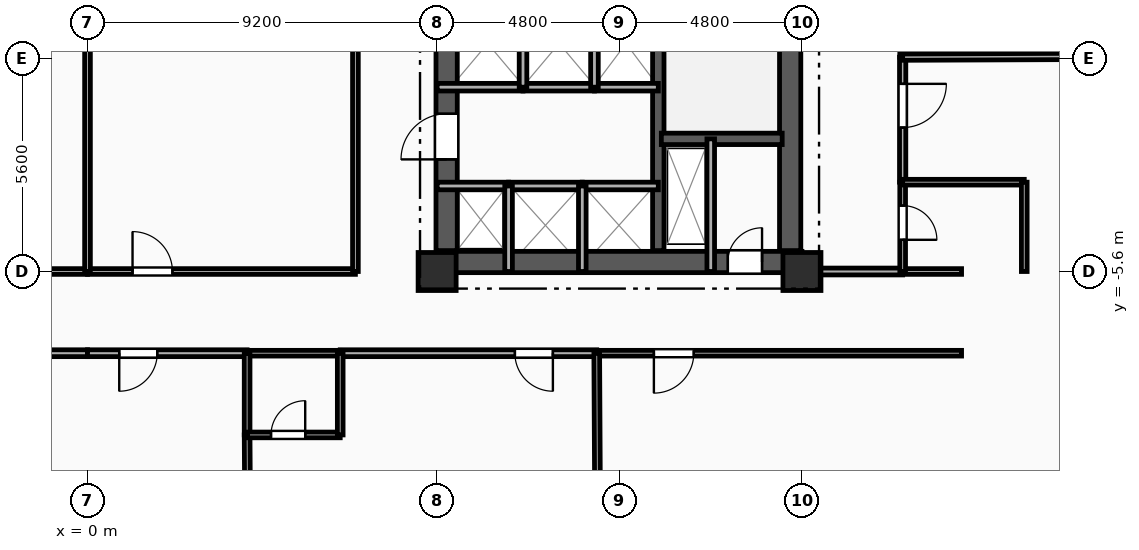
"""IFC4 building model, lengths in metres.
Left out: names, types, materials, properties, quantities, classifications, styles, units other than length and angle.
Written with IfcOpenShell. Run it as: python <this file> out.ifc"""

import sys

from ifc_helpers import new_model, si_unit, direction, frame, frame_2d, origin, origin_2d, place, context, subcontext, project, spatial, rectangle, extrude, element, fill, save


model = new_model("IFC4")
c1 = context("Model", 3, precision=1e-05, world=origin(), true_north=direction((0.0, 1.0)))
c2 = subcontext(c1, "Body", "Model", "MODEL_VIEW")
j1 = project(units=[si_unit("LENGTHUNIT", "METRE"), si_unit("PLANEANGLEUNIT", "RADIAN")], contexts=[c1])
p1 = place(None, origin())
s1 = spatial("IfcSite", under=j1, at=p1, CompositionType="ELEMENT")
p2 = place(p1, origin())
s2 = spatial("IfcBuilding", under=s1, at=p2, CompositionType="ELEMENT")
p3 = place(p2, frame((0.0, 0.0, 85.7)))
s3 = spatial("IfcBuildingStorey", under=s2, at=p3, CompositionType="ELEMENT", Elevation=85.7)
for number, where, z_axis, x_axis in (
    (1, (9.2, -5.6, 0.0), (0.0, 0.0, 1.0), (1.0, 0.0, 0.0)),
    (2, (18.8, -5.6, 0.0), (0.0, 0.0, 1.0), (1.0, 0.0, 0.0)),
):
    element("IfcColumn", number, at=place(p3, frame(where, z_axis=z_axis, x_axis=x_axis)), inside=s3, PredefinedType="COLUMN", context=c2, shape_type="SweptSolid", body=[
        extrude(rectangle(XDim=1.0, YDim=1.0, at=origin_2d()), origin(), (0.0, 0.0, 1.0), 3.35),
    ])
p4 = place(p3, frame((9.2, -5.35, 0.0), z_axis=(0.0, 0.0, 1.0), x_axis=(1.0, 0.0, 0.0)))
e3 = element("IfcWall", 3, at=p4, inside=s3, PredefinedType="SHEAR", context=c2, shape_type="SweptSolid", body=[
    extrude(rectangle(XDim=9.6, YDim=0.56, at=frame_2d((4.8, 0.0))), origin(), (0.0, 0.0, 1.0), 3.045),
])
p5 = place(p4, frame((7.65, 0.0, 0.0)))
e4 = element("IfcOpeningElement", 4, at=p5, cuts=e3, PredefinedType="OPENING", context=c2, shape_type="SweptSolid", body=[
    extrude(rectangle(XDim=0.9, YDim=2.1, at=frame_2d((0.45, 1.05))), frame((0.0, 0.29, 0.0), z_axis=(0.0, -1.0, 0.0), x_axis=(1.0, 0.0, 0.0)), (0.0, 0.0, 1.0), 0.58),
])
p6 = place(p3, frame((9.45, -5.05, 0.0), z_axis=(0.0, 0.0, 1.0), x_axis=(0.0, 1.0, 0.0)))
e5 = element("IfcWall", 5, at=p6, inside=s3, PredefinedType="SHEAR", context=c2, shape_type="SweptSolid", body=[
    extrude(rectangle(XDim=10.1, YDim=0.56, at=frame_2d((5.05, 0.0))), origin(), (0.0, 0.0, 1.0), 3.045),
])
p7 = place(p6, frame((7.15, 0.0, 0.0)))
e6 = element("IfcOpeningElement", 6, at=p7, cuts=e5, PredefinedType="OPENING", context=c2, shape_type="SweptSolid", body=[
    extrude(rectangle(XDim=0.9, YDim=2.1, at=frame_2d((0.45, 1.05))), frame((0.0, 0.29, 0.0), z_axis=(0.0, -1.0, 0.0), x_axis=(1.0, 0.0, 0.0)), (0.0, 0.0, 1.0), 0.58),
])
p8 = place(p6, frame((2.4, 0.0, 0.0)))
e7 = element("IfcOpeningElement", 7, at=p8, cuts=e5, PredefinedType="OPENING", context=c2, shape_type="SweptSolid", body=[
    extrude(rectangle(XDim=1.2, YDim=2.15, at=frame_2d((0.6, 1.075))), frame((0.0, 0.29, 0.0), z_axis=(0.0, -1.0, 0.0), x_axis=(1.0, 0.0, 0.0)), (0.0, 0.0, 1.0), 0.58),
])
p9 = place(p3, frame((18.49, -5.05, 0.0), z_axis=(0.0, 0.0, 1.0), x_axis=(0.0, 1.0, 0.0)))
e8 = element("IfcWall", 8, at=p9, inside=s3, PredefinedType="SHEAR", context=c2, shape_type="SweptSolid", body=[
    extrude(rectangle(XDim=10.1, YDim=0.56, at=frame_2d((5.05, 0.0))), origin(), (0.0, 0.0, 1.0), 3.045),
])
p10 = place(p3, frame((15.02, -5.05, 0.0), z_axis=(0.0, 0.0, 1.0), x_axis=(0.0, 1.0, 0.0)))
e9 = element("IfcWall", 9, at=p10, inside=s3, PredefinedType="SHEAR", context=c2, shape_type="SweptSolid", body=[
    extrude(rectangle(XDim=10.1, YDim=0.3, at=frame_2d((5.05, 0.0))), origin(), (0.0, 0.0, 1.0), 3.045),
])
p11 = place(p3, frame((15.1, -2.11, 0.0), z_axis=(0.0, 0.0, 1.0), x_axis=(1.0, 0.0, 0.0)))
e10 = element("IfcWall", 10, at=p11, inside=s3, PredefinedType="SHEAR", context=c2, shape_type="SweptSolid", body=[
    extrude(rectangle(XDim=3.18, YDim=0.3, at=frame_2d((1.59, 0.0))), origin(), (0.0, 0.0, 1.0), 3.045),
])
p12 = place(p3, frame((16.4, -2.11, 0.0), z_axis=(0.0, 0.0, 1.0), x_axis=(0.0, -1.0, 0.0)))
e11 = element("IfcWall", 11, at=p12, inside=s3, PredefinedType="PARTITIONING", context=c2, shape_type="SweptSolid", body=[
    extrude(rectangle(XDim=3.49, YDim=0.2, at=frame_2d((1.745, 0.0))), origin(), (0.0, 0.0, 1.0), 3.045),
])
p13 = place(p3, frame((9.2, -3.35, 0.0), z_axis=(0.0, 0.0, 1.0), x_axis=(1.0, 0.0, 0.0)))
e12 = element("IfcWall", 12, at=p13, inside=s3, PredefinedType="PARTITIONING", context=c2, shape_type="SweptSolid", body=[
    extrude(rectangle(XDim=1.88, YDim=0.2, at=frame_2d((0.94, 0.0))), origin(), (0.0, 0.0, 1.0), 2.76),
])
p14 = place(p3, frame((11.08, -3.35, 0.0), z_axis=(0.0, 0.0, 1.0), x_axis=(1.0, 0.0, 0.0)))
e13 = element("IfcWall", 13, at=p14, inside=s3, PredefinedType="PARTITIONING", context=c2, shape_type="SweptSolid", body=[
    extrude(rectangle(XDim=1.94, YDim=0.2, at=frame_2d((0.97, 0.0))), origin(), (0.0, 0.0, 1.0), 3.045),
])
p15 = place(p3, frame((13.02, -3.35, 0.0), z_axis=(0.0, 0.0, 1.0), x_axis=(1.0, 0.0, 0.0)))
e14 = element("IfcWall", 14, at=p15, inside=s3, PredefinedType="PARTITIONING", context=c2, shape_type="SweptSolid", body=[
    extrude(rectangle(XDim=2.0, YDim=0.2, at=frame_2d((1.0, 0.0))), origin(), (0.0, 0.0, 1.0), 3.045),
])
p16 = place(p3, frame((11.46, -0.75, 0.0), z_axis=(0.0, 0.0, 1.0), x_axis=(-1.0, 0.0, 0.0)))
e15 = element("IfcWall", 15, at=p16, inside=s3, PredefinedType="PARTITIONING", context=c2, shape_type="SweptSolid", body=[
    extrude(rectangle(XDim=2.26, YDim=0.2, at=frame_2d((1.13, 0.0))), origin(), (0.0, 0.0, 1.0), 3.045),
])
p17 = place(p3, frame((13.34, -0.75, 0.0), z_axis=(0.0, 0.0, 1.0), x_axis=(-1.0, 0.0, 0.0)))
e16 = element("IfcWall", 16, at=p17, inside=s3, PredefinedType="PARTITIONING", context=c2, shape_type="SweptSolid", body=[
    extrude(rectangle(XDim=1.88, YDim=0.2, at=frame_2d((0.94, 0.0))), origin(), (0.0, 0.0, 1.0), 3.045),
])
p18 = place(p3, frame((15.02, -0.75, 0.0), z_axis=(0.0, 0.0, 1.0), x_axis=(-1.0, 0.0, 0.0)))
e17 = element("IfcWall", 17, at=p18, inside=s3, PredefinedType="PARTITIONING", context=c2, shape_type="SweptSolid", body=[
    extrude(rectangle(XDim=1.68, YDim=0.2, at=frame_2d((0.84, 0.0))), origin(), (0.0, 0.0, 1.0), 3.045),
])
for number, where, z_axis, x_axis in (
    (18, (11.08, -5.6, 0.0), (0.0, 0.0, 1.0), (0.0, 1.0, 0.0)),
    (19, (13.02, -5.6, 0.0), (0.0, 0.0, 1.0), (0.0, 1.0, 0.0)),
):
    element("IfcWall", number, at=place(p3, frame(where, z_axis=z_axis, x_axis=x_axis)), inside=s3, PredefinedType="PARTITIONING", context=c2, shape_type="SweptSolid", body=[
        extrude(rectangle(XDim=2.25, YDim=0.2, at=frame_2d((1.125, 0.0))), origin(), (0.0, 0.0, 1.0), 3.045),
    ])
for number, where, z_axis, x_axis in (
    (20, (11.46, -0.75, 0.0), (0.0, 0.0, 1.0), (0.0, 1.0, 0.0)),
    (21, (13.34, -0.75, 0.0), (0.0, 0.0, 1.0), (0.0, 1.0, 0.0)),
):
    element("IfcWall", number, at=place(p3, frame(where, z_axis=z_axis, x_axis=x_axis)), inside=s3, PredefinedType="PARTITIONING", context=c2, shape_type="SweptSolid", body=[
        extrude(rectangle(XDim=2.3, YDim=0.2, at=frame_2d((1.15, 0.0))), origin(), (0.0, 0.0, 1.0), 3.045),
    ])
p19 = place(p3, frame((0.0, -7.75, 0.0), z_axis=(0.0, 0.0, 1.0), x_axis=(-1.0, 0.0, 0.0)))
e22 = element("IfcWall", 22, at=p19, inside=s3, PredefinedType="PARTITIONING", context=c2, shape_type="SweptSolid", body=[
    extrude(rectangle(XDim=2.55, YDim=0.18, at=frame_2d((1.275, 0.0))), origin(), (0.0, 0.0, 1.0), 3.045),
])
p20 = place(p3, frame((-7.05, -5.6, 0.0), z_axis=(0.0, 0.0, 1.0), x_axis=(1.0, 0.0, 0.0)))
e23 = element("IfcWall", 23, at=p20, inside=s3, PredefinedType="PARTITIONING", context=c2, shape_type="SweptSolid", body=[
    extrude(rectangle(XDim=7.05, YDim=0.15, at=frame_2d((3.525, 0.0))), origin(), (0.0, 0.0, 1.0), 2.53),
])
p21 = place(p3, frame((18.8, -5.6, 0.0), z_axis=(0.0, 0.0, 1.0), x_axis=(1.0, 0.0, 0.0)))
e24 = element("IfcWall", 24, at=p21, inside=s3, PredefinedType="PARTITIONING", context=c2, shape_type="SweptSolid", body=[
    extrude(rectangle(XDim=2.65, YDim=0.18, at=frame_2d((1.325, 0.0))), origin(), (0.0, 0.0, 1.0), 2.53),
])
p22 = place(p3, frame((21.45, -5.6, 0.0), z_axis=(0.0, 0.0, 1.0), x_axis=(1.0, 0.0, 0.0)))
e25 = element("IfcWall", 25, at=p22, inside=s3, PredefinedType="PLUMBINGWALL", context=c2, shape_type="SweptSolid", body=[
    extrude(rectangle(XDim=1.55, YDim=0.15, at=frame_2d((0.775, 0.0))), origin(), (0.0, 0.0, 1.0), 3.045),
])
p23 = place(p3, frame((4.2, -7.75, 0.0), z_axis=(0.0, 0.0, 1.0), x_axis=(-1.0, 0.0, 0.0)))
e26 = element("IfcWall", 26, at=p23, inside=s3, PredefinedType="PARTITIONING", context=c2, shape_type="SweptSolid", body=[
    extrude(rectangle(XDim=4.2, YDim=0.18, at=frame_2d((2.1, 0.0))), origin(), (0.0, 0.0, 1.0), 3.045),
])
p24 = place(p23, frame((2.365, 0.0, 0.0)))
e27 = element("IfcOpeningElement", 27, at=p24, cuts=e26, PredefinedType="OPENING", context=c2, shape_type="SweptSolid", body=[
    extrude(rectangle(XDim=1.0, YDim=2.15, at=frame_2d((0.5, 1.075))), frame((0.0, 0.1, 0.0), z_axis=(0.0, -1.0, 0.0), x_axis=(1.0, 0.0, 0.0)), (0.0, 0.0, 1.0), 0.2),
])
p25 = place(p3, frame((13.4, -7.75, 0.0), z_axis=(0.0, 0.0, 1.0), x_axis=(-1.0, 0.0, 0.0)))
e28 = element("IfcWall", 28, at=p25, inside=s3, PredefinedType="PARTITIONING", context=c2, shape_type="SweptSolid", body=[
    extrude(rectangle(XDim=6.75, YDim=0.18, at=frame_2d((3.375, 0.0))), origin(), (0.0, 0.0, 1.0), 3.045),
])
p26 = place(p25, frame((1.154, 0.0, 0.0)))
e29 = element("IfcOpeningElement", 29, at=p26, cuts=e28, PredefinedType="OPENING", context=c2, shape_type="SweptSolid", body=[
    extrude(rectangle(XDim=1.0, YDim=2.15, at=frame_2d((0.5, 1.075))), frame((0.0, 0.1, 0.0), z_axis=(0.0, -1.0, 0.0), x_axis=(1.0, 0.0, 0.0)), (0.0, 0.0, 1.0), 0.2),
])
p27 = place(p3, frame((6.65, -7.75, 0.0), z_axis=(0.0, 0.0, 1.0), x_axis=(-1.0, 0.0, 0.0)))
e30 = element("IfcWall", 30, at=p27, inside=s3, PredefinedType="PLUMBINGWALL", context=c2, shape_type="SweptSolid", body=[
    extrude(rectangle(XDim=2.45, YDim=0.15, at=frame_2d((1.225, 0.0))), origin(), (0.0, 0.0, 1.0), 3.045),
])
p28 = place(p3, frame((23.0, -7.75, 0.0), z_axis=(0.0, 0.0, 1.0), x_axis=(-1.0, 0.0, 0.0)))
e31 = element("IfcWall", 31, at=p28, inside=s3, PredefinedType="PARTITIONING", context=c2, shape_type="SweptSolid", body=[
    extrude(rectangle(XDim=9.6, YDim=0.15, at=frame_2d((4.8, 0.0))), origin(), (0.0, 0.0, 1.0), 3.045),
])
p29 = place(p28, frame((7.046, 0.0, 0.0)))
e32 = element("IfcOpeningElement", 32, at=p29, cuts=e31, PredefinedType="OPENING", context=c2, shape_type="SweptSolid", body=[
    extrude(rectangle(XDim=1.05, YDim=2.15, at=frame_2d((0.525, 1.075))), frame((0.0, 0.085, 0.0), z_axis=(0.0, -1.0, 0.0), x_axis=(1.0, 0.0, 0.0)), (0.0, 0.0, 1.0), 0.17),
])
p30 = place(p3, frame((0.0, -5.6, 0.0), z_axis=(0.0, 0.0, 1.0), x_axis=(1.0, 0.0, 0.0)))
e33 = element("IfcWall", 33, at=p30, inside=s3, PredefinedType="PARTITIONING", context=c2, shape_type="SweptSolid", body=[
    extrude(rectangle(XDim=7.05, YDim=0.15, at=frame_2d((3.525, 0.0))), origin(), (0.0, 0.0, 1.0), 2.53),
])
p31 = place(p30, frame((1.185, 0.0, 0.0)))
e34 = element("IfcOpeningElement", 34, at=p31, cuts=e33, PredefinedType="OPENING", context=c2, shape_type="SweptSolid", body=[
    extrude(rectangle(XDim=1.05, YDim=2.15, at=frame_2d((0.525, 1.075))), frame((0.0, 0.085, 0.0), z_axis=(0.0, -1.0, 0.0), x_axis=(1.0, 0.0, 0.0)), (0.0, 0.0, 1.0), 0.17),
])
p32 = place(p3, frame((7.05, -5.6, 0.0), z_axis=(0.0, 0.0, 1.0), x_axis=(0.0, 1.0, 0.0)))
e35 = element("IfcWall", 35, at=p32, inside=s3, PredefinedType="PARTITIONING", context=c2, shape_type="SweptSolid", body=[
    extrude(rectangle(XDim=7.05, YDim=0.15, at=frame_2d((3.525, 0.0))), origin(), (0.0, 0.0, 1.0), 3.045),
])
p33 = place(p3, frame((21.45, -3.25, 0.0), z_axis=(0.0, 0.0, 1.0), x_axis=(0.0, -1.0, 0.0)))
e36 = element("IfcWall", 36, at=p33, inside=s3, PredefinedType="PLUMBINGWALL", context=c2, shape_type="SweptSolid", body=[
    extrude(rectangle(XDim=2.35, YDim=0.15, at=frame_2d((1.175, 0.0))), origin(), (0.0, 0.0, 1.0), 3.045),
])
p34 = place(p33, frame((0.616, 0.0, 0.0)))
e37 = element("IfcOpeningElement", 37, at=p34, cuts=e36, PredefinedType="OPENING", context=c2, shape_type="SweptSolid", body=[
    extrude(rectangle(XDim=0.9, YDim=2.1, at=frame_2d((0.45, 1.05))), frame((0.0, 0.085, 0.0), z_axis=(0.0, -1.0, 0.0), x_axis=(1.0, 0.0, 0.0)), (0.0, 0.0, 1.0), 0.17),
])
p35 = place(p3, frame((21.45, 0.04, 0.0), z_axis=(0.0, 0.0, 1.0), x_axis=(0.0, -1.0, 0.0)))
e38 = element("IfcWall", 38, at=p35, inside=s3, PredefinedType="PARTITIONING", context=c2, shape_type="SweptSolid", body=[
    extrude(rectangle(XDim=3.29, YDim=0.165, at=frame_2d((1.645, 0.0))), origin(), (0.0, 0.0, 1.0), 3.045),
])
p36 = place(p35, frame((0.702, 0.0, 0.0)))
e39 = element("IfcOpeningElement", 39, at=p36, cuts=e38, PredefinedType="OPENING", context=c2, shape_type="SweptSolid", body=[
    extrude(rectangle(XDim=1.15, YDim=2.15, at=frame_2d((0.575, 1.075))), frame((0.0, 0.093, 0.0), z_axis=(0.0, -1.0, 0.0), x_axis=(1.0, 0.0, 0.0)), (0.0, 0.0, 1.0), 0.185),
])
p37 = place(p3, frame((21.45, 2.155, 0.0), z_axis=(0.0, 0.0, 1.0), x_axis=(0.0, -1.0, 0.0)))
e40 = element("IfcWall", 40, at=p37, inside=s3, PredefinedType="PARTITIONING", context=c2, shape_type="SweptSolid", body=[
    extrude(rectangle(XDim=2.115, YDim=0.15, at=frame_2d((1.058, 0.0))), origin(), (0.0, 0.0, 1.0), 3.045),
])
p38 = place(p37, frame((0.583, 0.0, 0.0)))
e41 = element("IfcOpeningElement", 41, at=p38, cuts=e40, PredefinedType="OPENING", context=c2, shape_type="SweptSolid", body=[
    extrude(rectangle(XDim=0.95, YDim=2.1, at=frame_2d((0.475, 1.05))), frame((0.0, 0.085, 0.0), z_axis=(0.0, -1.0, 0.0), x_axis=(1.0, 0.0, 0.0)), (0.0, 0.0, 1.0), 0.17),
])
p39 = place(p3, frame((21.45, -3.25, 0.0), z_axis=(0.0, 0.0, 1.0), x_axis=(1.0, 0.0, 0.0)))
e42 = element("IfcWall", 42, at=p39, inside=s3, PredefinedType="PLUMBINGWALL", context=c2, shape_type="SweptSolid", body=[
    extrude(rectangle(XDim=3.2, YDim=0.15, at=frame_2d((1.6, 0.0))), origin(), (0.0, 0.0, 1.0), 3.045),
])
p40 = place(p3, frame((24.65, -3.25, 0.0), z_axis=(0.0, 0.0, 1.0), x_axis=(0.0, -1.0, 0.0)))
e43 = element("IfcWall", 43, at=p40, inside=s3, PredefinedType="PLUMBINGWALL", context=c2, shape_type="SweptSolid", body=[
    extrude(rectangle(XDim=2.35, YDim=0.15, at=frame_2d((1.175, 0.0))), origin(), (0.0, 0.0, 1.0), 3.045),
])
p41 = place(p3, frame((21.45, 0.04, 0.0), z_axis=(0.0, 0.0, 1.0), x_axis=(0.999991717636, 0.004069970361, 0.0)))
e44 = element("IfcWall", 44, at=p41, inside=s3, PredefinedType="PARTITIONING", context=c2, shape_type="SweptSolid", body=[
    extrude(rectangle(XDim=10.797, YDim=0.165, at=frame_2d((5.399, 0.0))), origin(), (0.0, 0.0, 1.0), 2.53),
])
p42 = place(p3, frame((4.2, -9.9, 0.0), z_axis=(0.0, 0.0, 1.0), x_axis=(0.00643855591, -0.999979272284, 0.0)))
e45 = element("IfcWall", 45, at=p42, inside=s3, PredefinedType="PARTITIONING", context=c2, shape_type="SweptSolid", body=[
    extrude(rectangle(XDim=6.825, YDim=0.15, at=frame_2d((3.413, 0.0))), origin(), (0.0, 0.0, 1.0), 3.045),
])
p43 = place(p3, frame((4.2, -7.75, 0.0), z_axis=(0.0, 0.0, 1.0), x_axis=(0.0, -1.0, 0.0)))
e46 = element("IfcWall", 46, at=p43, inside=s3, PredefinedType="PLUMBINGWALL", context=c2, shape_type="SweptSolid", body=[
    extrude(rectangle(XDim=2.15, YDim=0.15, at=frame_2d((1.075, 0.0))), origin(), (0.0, 0.0, 1.0), 3.045),
])
p44 = place(p3, frame((4.2, -9.9, 0.0), z_axis=(0.0, 0.0, 1.0), x_axis=(1.0, 0.0, 0.0)))
e47 = element("IfcWall", 47, at=p44, inside=s3, PredefinedType="PLUMBINGWALL", context=c2, shape_type="SweptSolid", body=[
    extrude(rectangle(XDim=2.45, YDim=0.15, at=frame_2d((1.225, 0.0))), origin(), (0.0, 0.0, 1.0), 3.045),
])
p45 = place(p44, frame((0.629, 0.0, 0.0)))
e48 = element("IfcOpeningElement", 48, at=p45, cuts=e47, PredefinedType="OPENING", context=c2, shape_type="SweptSolid", body=[
    extrude(rectangle(XDim=0.9, YDim=2.1, at=frame_2d((0.45, 1.05))), frame((0.0, 0.085, 0.0), z_axis=(0.0, -1.0, 0.0), x_axis=(1.0, 0.0, 0.0)), (0.0, 0.0, 1.0), 0.17),
])
p46 = place(p3, frame((6.65, -9.9, 0.0), z_axis=(0.0, 0.0, 1.0), x_axis=(0.0, 1.0, 0.0)))
e49 = element("IfcWall", 49, at=p46, inside=s3, PredefinedType="PLUMBINGWALL", context=c2, shape_type="SweptSolid", body=[
    extrude(rectangle(XDim=2.15, YDim=0.15, at=frame_2d((1.075, 0.0))), origin(), (0.0, 0.0, 1.0), 3.045),
])
p47 = place(p3, frame((13.4, -7.75, 0.0), z_axis=(0.0, 0.0, 1.0), x_axis=(0.005487554946, -0.999984943257, 0.0)))
e50 = element("IfcWall", 50, at=p47, inside=s3, PredefinedType="PARTITIONING", context=c2, shape_type="SweptSolid", body=[
    extrude(rectangle(XDim=8.008, YDim=0.15, at=frame_2d((4.004, 0.0))), origin(), (0.0, 0.0, 1.0), 3.045),
])
p48 = place(p3, frame((0.0, 1.45, 0.0), z_axis=(0.0, 0.0, 1.0), x_axis=(0.0, -1.0, 0.0)))
e51 = element("IfcWall", 51, at=p48, inside=s3, PredefinedType="PARTITIONING", context=c2, shape_type="SweptSolid", body=[
    extrude(rectangle(XDim=7.05, YDim=0.15, at=frame_2d((3.525, 0.0))), origin(), (0.0, 0.0, 1.0), 3.045),
])
p49 = place(p5, origin())
e52 = element("IfcDoor", 52, at=p49, inside=s3, OperationType="SINGLE_SWING_RIGHT", PredefinedType="DOOR", context=c2, shape_type="SweptSolid", body=[
    extrude(rectangle(XDim=0.9, YDim=2.1, at=frame_2d((0.45, 1.05))), frame((0.0, 0.025, 0.0), z_axis=(0.0, -1.0, 0.0), x_axis=(1.0, 0.0, 0.0)), (0.0, 0.0, 1.0), 0.05),
])
fill(e4, e52)
p50 = place(p8, origin())
e53 = element("IfcDoor", 53, at=p50, inside=s3, OperationType="SINGLE_SWING_LEFT", PredefinedType="DOOR", context=c2, shape_type="SweptSolid", body=[
    extrude(rectangle(XDim=1.2, YDim=2.15, at=frame_2d((0.6, 1.075))), frame((0.0, 0.025, 0.0), z_axis=(0.0, -1.0, 0.0), x_axis=(1.0, 0.0, 0.0)), (0.0, 0.0, 1.0), 0.05),
])
fill(e7, e53)
p51 = place(p24, origin())
e54 = element("IfcDoor", 54, at=p51, inside=s3, OperationType="SINGLE_SWING_RIGHT", PredefinedType="DOOR", context=c2, shape_type="SweptSolid", body=[
    extrude(rectangle(XDim=1.0, YDim=2.15, at=frame_2d((0.5, 1.075))), frame((0.0, 0.025, 0.0), z_axis=(0.0, -1.0, 0.0), x_axis=(1.0, 0.0, 0.0)), (0.0, 0.0, 1.0), 0.05),
])
fill(e27, e54)
p52 = place(p26, origin())
e55 = element("IfcDoor", 55, at=p52, inside=s3, OperationType="SINGLE_SWING_LEFT", PredefinedType="DOOR", context=c2, shape_type="SweptSolid", body=[
    extrude(rectangle(XDim=1.0, YDim=2.15, at=frame_2d((0.5, 1.075))), frame((0.0, 0.025, 0.0), z_axis=(0.0, -1.0, 0.0), x_axis=(1.0, 0.0, 0.0)), (0.0, 0.0, 1.0), 0.05),
])
fill(e29, e55)
p53 = place(p29, origin())
e56 = element("IfcDoor", 56, at=p53, inside=s3, OperationType="SINGLE_SWING_RIGHT", PredefinedType="DOOR", context=c2, shape_type="SweptSolid", body=[
    extrude(rectangle(XDim=1.05, YDim=2.15, at=frame_2d((0.525, 1.075))), frame((0.0, 0.025, 0.0), z_axis=(0.0, -1.0, 0.0), x_axis=(1.0, 0.0, 0.0)), (0.0, 0.0, 1.0), 0.05),
])
fill(e32, e56)
p54 = place(p31, origin())
e57 = element("IfcDoor", 57, at=p54, inside=s3, OperationType="SINGLE_SWING_LEFT", PredefinedType="DOOR", context=c2, shape_type="SweptSolid", body=[
    extrude(rectangle(XDim=1.05, YDim=2.15, at=frame_2d((0.525, 1.075))), frame((0.0, 0.025, 0.0), z_axis=(0.0, -1.0, 0.0), x_axis=(1.0, 0.0, 0.0)), (0.0, 0.0, 1.0), 0.05),
])
fill(e34, e57)
p55 = place(p34, origin())
e58 = element("IfcDoor", 58, at=p55, inside=s3, OperationType="SINGLE_SWING_RIGHT", PredefinedType="DOOR", context=c2, shape_type="SweptSolid", body=[
    extrude(rectangle(XDim=0.9, YDim=2.1, at=frame_2d((0.45, 1.05))), frame((0.0, 0.025, 0.0), z_axis=(0.0, -1.0, 0.0), x_axis=(1.0, 0.0, 0.0)), (0.0, 0.0, 1.0), 0.05),
])
fill(e37, e58)
p56 = place(p36, origin())
e59 = element("IfcDoor", 59, at=p56, inside=s3, OperationType="SINGLE_SWING_LEFT", PredefinedType="DOOR", context=c2, shape_type="SweptSolid", body=[
    extrude(rectangle(XDim=1.15, YDim=2.15, at=frame_2d((0.575, 1.075))), frame((0.0, 0.025, 0.0), z_axis=(0.0, -1.0, 0.0), x_axis=(1.0, 0.0, 0.0)), (0.0, 0.0, 1.0), 0.05),
])
fill(e39, e59)
p57 = place(p45, origin())
e60 = element("IfcDoor", 60, at=p57, inside=s3, OperationType="SINGLE_SWING_RIGHT", PredefinedType="DOOR", context=c2, shape_type="SweptSolid", body=[
    extrude(rectangle(XDim=0.9, YDim=2.1, at=frame_2d((0.45, 1.05))), frame((0.0, 0.025, 0.0), z_axis=(0.0, -1.0, 0.0), x_axis=(1.0, 0.0, 0.0)), (0.0, 0.0, 1.0), 0.05),
])
fill(e48, e60)
save(model, sys.argv[1])
